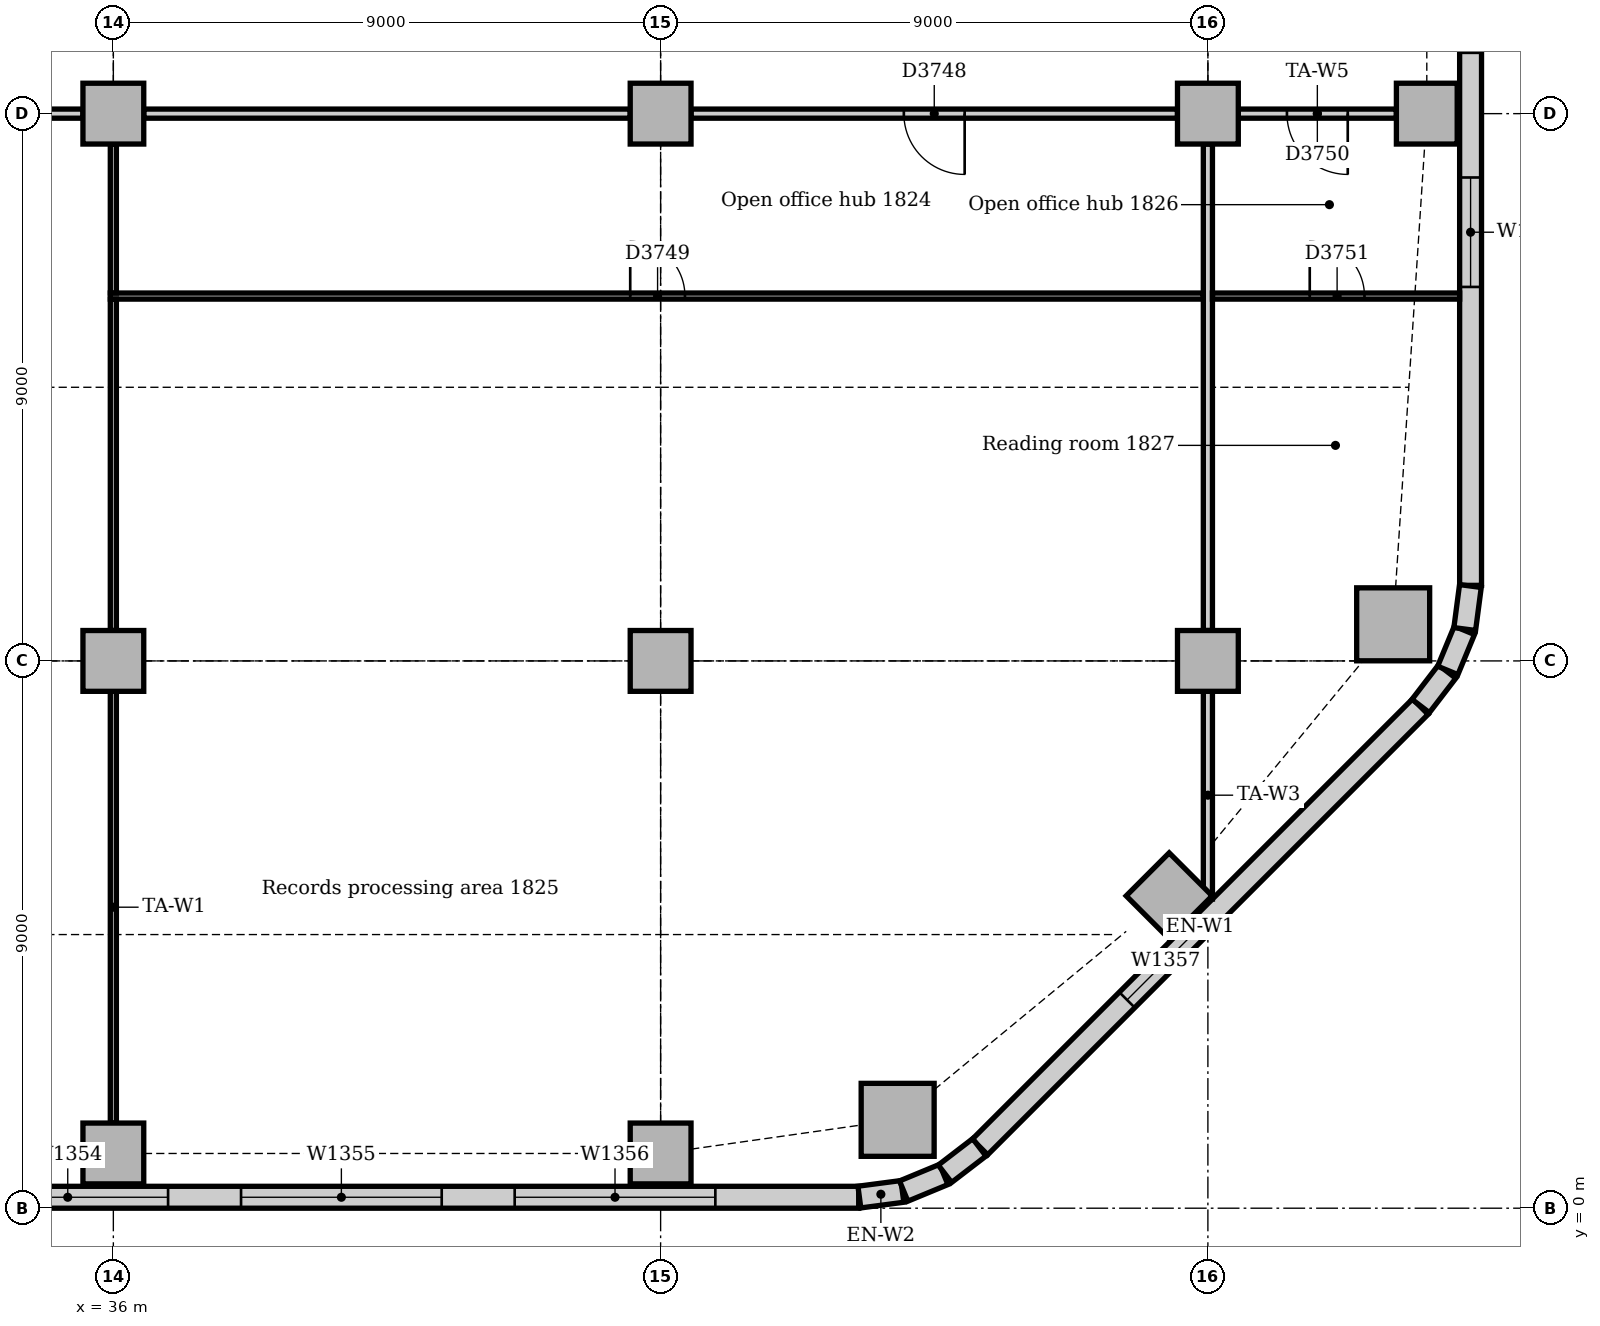
"""IFC4 building model, lengths in metres.
Left out: names, types, materials, properties, quantities, classifications, styles, units other than length and angle.
Written with IfcOpenShell. Run it as: python <this file> out.ifc"""

import sys

from ifc_helpers import new_model, si_unit, direction, frame, frame_2d, origin, origin_2d, place, context, subcontext, project, spatial, rectangle, extrude, element, fill, save


model = new_model("IFC4")
c1 = context("Model", 3, precision=1e-05, world=origin(), true_north=direction((0.0, 1.0)))
c2 = subcontext(c1, "Body", "Model", "MODEL_VIEW")
j1 = project(units=[si_unit("LENGTHUNIT", "METRE"), si_unit("PLANEANGLEUNIT", "RADIAN")], contexts=[c1])
p1 = place(None, origin())
s1 = spatial("IfcSite", under=j1, at=p1, CompositionType="ELEMENT")
p2 = place(p1, origin())
s2 = spatial("IfcBuilding", under=s1, at=p2, CompositionType="ELEMENT")
p3 = place(p2, frame((0.0, 0.0, 79.0)))
s3 = spatial("IfcBuildingStorey", under=s2, at=p3, CompositionType="ELEMENT", Elevation=79.0)
for number, where, z_axis, x_axis in (
    (1, (48.898, 1.453, 0.0), (0.0, 0.0, 1.0), (1.0, 0.0, 0.0)),
    (2, (57.047, 9.602, 0.0), (0.0, 0.0, 1.0), (1.0, 0.0, 0.0)),
):
    element("IfcColumn", number, at=place(p3, frame(where, z_axis=z_axis, x_axis=x_axis)), inside=s3, PredefinedType="COLUMN", context=c2, shape_type="SweptSolid", body=[
        extrude(rectangle(XDim=1.2, YDim=1.2, at=origin_2d()), origin(), (0.0, 0.0, 1.0), 3.85),
    ])
for number, where, z_axis, x_axis in (
    (3, (36.0, 0.9, 0.0), (0.0, 0.0, 1.0), (1.0, 0.0, 0.0)),
    (4, (45.0, 0.9, 0.0), (0.0, 0.0, 1.0), (1.0, 0.0, 0.0)),
    (5, (53.364, 5.136, 0.0), (0.0, 0.0, 1.0), (0.707, 0.707, 0.0)),
    (6, (57.6, 18.0, 0.0), (0.0, 0.0, 1.0), (1.0, 0.0, 0.0)),
    (7, (36.0, 9.0, 0.0), (0.0, 0.0, 1.0), (1.0, 0.0, 0.0)),
    (8, (36.0, 18.0, 0.0), (0.0, 0.0, 1.0), (1.0, 0.0, 0.0)),
    (9, (45.0, 9.0, 0.0), (0.0, 0.0, 1.0), (1.0, 0.0, 0.0)),
    (10, (45.0, 18.0, 0.0), (0.0, 0.0, 1.0), (1.0, 0.0, 0.0)),
    (11, (54.0, 9.0, 0.0), (0.0, 0.0, 1.0), (1.0, 0.0, 0.0)),
    (12, (54.0, 18.0, 0.0), (0.0, 0.0, 1.0), (1.0, 0.0, 0.0)),
):
    element("IfcColumn", number, at=place(p3, frame(where, z_axis=z_axis, x_axis=x_axis)), inside=s3, PredefinedType="COLUMN", context=c2, shape_type="SweptSolid", body=[
        extrude(rectangle(XDim=1.0, YDim=1.0, at=origin_2d()), origin(), (0.0, 0.0, 1.0), 3.85),
    ])
p4 = place(p3, frame((4.243, 0.18, 0.0), z_axis=(0.0, 0.0, 1.0), x_axis=(1.0, 0.0, 0.0)))
e13 = element("IfcWall", 13, at=p4, inside=s3, PredefinedType="STANDARD", context=c2, shape_type="SweptSolid", body=[
    extrude(rectangle(XDim=44.015, YDim=0.36, at=frame_2d((22.007, 0.0))), origin(), (0.0, 0.0, 1.0), 3.85),
])
p5 = place(p4, frame((2.707, 0.0, 0.9)))
e14 = element("IfcOpeningElement", 14, at=p5, cuts=e13, PredefinedType="OPENING", context=c2, shape_type="SweptSolid", body=[
    extrude(rectangle(XDim=3.3, YDim=1.6, at=frame_2d((1.65, 0.8))), frame((0.0, 0.19, 0.0), z_axis=(0.0, -1.0, 0.0), x_axis=(1.0, 0.0, 0.0)), (0.0, 0.0, 1.0), 0.38),
])
p6 = place(p4, frame((7.307, 0.0, 0.9)))
e15 = element("IfcOpeningElement", 15, at=p6, cuts=e13, PredefinedType="OPENING", context=c2, shape_type="SweptSolid", body=[
    extrude(rectangle(XDim=1.8, YDim=1.6, at=frame_2d((0.9, 0.8))), frame((0.0, 0.19, 0.0), z_axis=(0.0, -1.0, 0.0), x_axis=(1.0, 0.0, 0.0)), (0.0, 0.0, 1.0), 0.38),
])
p7 = place(p4, frame((11.357, 0.0, 0.9)))
e16 = element("IfcOpeningElement", 16, at=p7, cuts=e13, PredefinedType="OPENING", context=c2, shape_type="SweptSolid", body=[
    extrude(rectangle(XDim=3.3, YDim=1.6, at=frame_2d((1.65, 0.8))), frame((0.0, 0.19, 0.0), z_axis=(0.0, -1.0, 0.0), x_axis=(1.0, 0.0, 0.0)), (0.0, 0.0, 1.0), 0.38),
])
p8 = place(p4, frame((15.857, 0.0, 0.9)))
e17 = element("IfcOpeningElement", 17, at=p8, cuts=e13, PredefinedType="OPENING", context=c2, shape_type="SweptSolid", body=[
    extrude(rectangle(XDim=3.3, YDim=1.6, at=frame_2d((1.65, 0.8))), frame((0.0, 0.19, 0.0), z_axis=(0.0, -1.0, 0.0), x_axis=(1.0, 0.0, 0.0)), (0.0, 0.0, 1.0), 0.38),
])
p9 = place(p4, frame((20.357, 0.0, 0.9)))
e18 = element("IfcOpeningElement", 18, at=p9, cuts=e13, PredefinedType="OPENING", context=c2, shape_type="SweptSolid", body=[
    extrude(rectangle(XDim=3.3, YDim=1.6, at=frame_2d((1.65, 0.8))), frame((0.0, 0.19, 0.0), z_axis=(0.0, -1.0, 0.0), x_axis=(1.0, 0.0, 0.0)), (0.0, 0.0, 1.0), 0.38),
])
p10 = place(p4, frame((24.857, 0.0, 0.9)))
e19 = element("IfcOpeningElement", 19, at=p10, cuts=e13, PredefinedType="OPENING", context=c2, shape_type="SweptSolid", body=[
    extrude(rectangle(XDim=3.3, YDim=1.6, at=frame_2d((1.65, 0.8))), frame((0.0, 0.19, 0.0), z_axis=(0.0, -1.0, 0.0), x_axis=(1.0, 0.0, 0.0)), (0.0, 0.0, 1.0), 0.38),
])
p11 = place(p4, frame((29.357, 0.0, 0.9)))
e20 = element("IfcOpeningElement", 20, at=p11, cuts=e13, PredefinedType="OPENING", context=c2, shape_type="SweptSolid", body=[
    extrude(rectangle(XDim=3.3, YDim=1.6, at=frame_2d((1.65, 0.8))), frame((0.0, 0.19, 0.0), z_axis=(0.0, -1.0, 0.0), x_axis=(1.0, 0.0, 0.0)), (0.0, 0.0, 1.0), 0.38),
])
p12 = place(p4, frame((33.857, 0.0, 0.9)))
e21 = element("IfcOpeningElement", 21, at=p12, cuts=e13, PredefinedType="OPENING", context=c2, shape_type="SweptSolid", body=[
    extrude(rectangle(XDim=3.3, YDim=1.6, at=frame_2d((1.65, 0.8))), frame((0.0, 0.19, 0.0), z_axis=(0.0, -1.0, 0.0), x_axis=(1.0, 0.0, 0.0)), (0.0, 0.0, 1.0), 0.38),
])
p13 = place(p4, frame((38.357, 0.0, 0.9)))
e22 = element("IfcOpeningElement", 22, at=p13, cuts=e13, PredefinedType="OPENING", context=c2, shape_type="SweptSolid", body=[
    extrude(rectangle(XDim=3.3, YDim=1.6, at=frame_2d((1.65, 0.8))), frame((0.0, 0.19, 0.0), z_axis=(0.0, -1.0, 0.0), x_axis=(1.0, 0.0, 0.0)), (0.0, 0.0, 1.0), 0.38),
])
p14 = place(p3, frame((50.251, 1.006, 0.0), z_axis=(0.0, 0.0, 1.0), x_axis=(0.707106781187, 0.707106781187, 0.0)))
e23 = element("IfcWall", 23, at=p14, inside=s3, PredefinedType="STANDARD", context=c2, shape_type="SweptSolid", body=[
    extrude(rectangle(XDim=10.243, YDim=0.36, at=frame_2d((5.121, 0.0))), origin(), (0.0, 0.0, 1.0), 3.85),
])
p15 = place(p14, frame((3.421, 0.0, 0.9)))
e24 = element("IfcOpeningElement", 24, at=p15, cuts=e23, PredefinedType="OPENING", context=c2, shape_type="SweptSolid", body=[
    extrude(rectangle(XDim=1.8, YDim=1.6, at=frame_2d((0.9, 0.8))), frame((0.0, 0.19, 0.0), z_axis=(0.0, -1.0, 0.0), x_axis=(1.0, 0.0, 0.0)), (0.0, 0.0, 1.0), 0.38),
])
p16 = place(p3, frame((58.32, 10.243, 0.0), z_axis=(0.0, 0.0, 1.0), x_axis=(0.0, 1.0, 0.0)))
e25 = element("IfcWall", 25, at=p16, inside=s3, PredefinedType="STANDARD", context=c2, shape_type="SweptSolid", body=[
    extrude(rectangle(XDim=24.515, YDim=0.36, at=frame_2d((12.257, 0.0))), origin(), (0.0, 0.0, 1.0), 3.85),
])
p17 = place(p16, frame((4.907, 0.0, 0.9)))
e26 = element("IfcOpeningElement", 26, at=p17, cuts=e25, PredefinedType="OPENING", context=c2, shape_type="SweptSolid", body=[
    extrude(rectangle(XDim=1.8, YDim=1.6, at=frame_2d((0.9, 0.8))), frame((0.0, 0.19, 0.0), z_axis=(0.0, -1.0, 0.0), x_axis=(1.0, 0.0, 0.0)), (0.0, 0.0, 1.0), 0.38),
])
p18 = place(p16, frame((8.757, 0.0, 0.9)))
e27 = element("IfcOpeningElement", 27, at=p18, cuts=e25, PredefinedType="OPENING", context=c2, shape_type="SweptSolid", body=[
    extrude(rectangle(XDim=1.8, YDim=1.6, at=frame_2d((0.9, 0.8))), frame((0.0, 0.19, 0.0), z_axis=(0.0, -1.0, 0.0), x_axis=(1.0, 0.0, 0.0)), (0.0, 0.0, 1.0), 0.38),
])
p19 = place(p16, frame((12.857, 0.0, 0.9)))
e28 = element("IfcOpeningElement", 28, at=p19, cuts=e25, PredefinedType="OPENING", context=c2, shape_type="SweptSolid", body=[
    extrude(rectangle(XDim=3.3, YDim=1.6, at=frame_2d((1.65, 0.8))), frame((0.0, 0.19, 0.0), z_axis=(0.0, -1.0, 0.0), x_axis=(1.0, 0.0, 0.0)), (0.0, 0.0, 1.0), 0.38),
])
p20 = place(p16, frame((17.357, 0.0, 0.9)))
e29 = element("IfcOpeningElement", 29, at=p20, cuts=e25, PredefinedType="OPENING", context=c2, shape_type="SweptSolid", body=[
    extrude(rectangle(XDim=3.3, YDim=1.6, at=frame_2d((1.65, 0.8))), frame((0.0, 0.19, 0.0), z_axis=(0.0, -1.0, 0.0), x_axis=(1.0, 0.0, 0.0)), (0.0, 0.0, 1.0), 0.38),
])
for number, where, z_axis, x_axis in (
    (30, (48.269, 0.183, 0.0), (0.0, 0.0, 1.0), (0.991, 0.131, 0.0)),
    (31, (48.997, 0.282, 0.0), (0.0, 0.0, 1.0), (0.924, 0.383, 0.0)),
):
    element("IfcWall", number, at=place(p3, frame(where, z_axis=z_axis, x_axis=x_axis)), inside=s3, PredefinedType="STANDARD", context=c2, shape_type="SweptSolid", body=[
        extrude(rectangle(XDim=0.713, YDim=0.36, at=frame_2d((0.356, 0.0))), origin(), (0.0, 0.0, 1.0), 3.85),
    ])
for number, where, z_axis, x_axis in (
    (32, (49.675, 0.566, 0.0), (0.0, 0.0, 1.0), (0.793, 0.609, 0.0)),
    (33, (57.5, 8.259, 0.0), (0.0, 0.0, 1.0), (0.609, 0.793, 0.0)),
):
    element("IfcWall", number, at=place(p3, frame(where, z_axis=z_axis, x_axis=x_axis)), inside=s3, PredefinedType="STANDARD", context=c2, shape_type="SweptSolid", body=[
        extrude(rectangle(XDim=0.713, YDim=0.36, at=frame_2d((0.357, 0.0))), origin(), (0.0, 0.0, 1.0), 3.85),
    ])
for number, where, z_axis, x_axis in (
    (34, (57.945, 8.844, 0.0), (0.0, 0.0, 1.0), (0.383, 0.924, 0.0)),
    (35, (58.224, 9.524, 0.0), (0.0, 0.0, 1.0), (0.131, 0.991, 0.0)),
):
    element("IfcWall", number, at=place(p3, frame(where, z_axis=z_axis, x_axis=x_axis)), inside=s3, PredefinedType="STANDARD", context=c2, shape_type="SweptSolid", body=[
        extrude(rectangle(XDim=0.713, YDim=0.36, at=frame_2d((0.356, 0.0))), origin(), (0.0, 0.0, 1.0), 3.85),
    ])
p21 = place(p3, frame((54.5, 18.0, 0.0), z_axis=(0.0, 0.0, 1.0), x_axis=(1.0, 0.0, 0.0)))
e36 = element("IfcWall", 36, at=p21, inside=s3, PredefinedType="PARTITIONING", context=c2, shape_type="SweptSolid", body=[
    extrude(rectangle(XDim=2.6, YDim=0.15, at=frame_2d((1.3, 0.0))), origin(), (0.0, 0.0, 1.0), 3.602),
])
p22 = place(p21, frame((0.8, 0.0, 0.0)))
e37 = element("IfcOpeningElement", 37, at=p22, cuts=e36, PredefinedType="OPENING", context=c2, shape_type="SweptSolid", body=[
    extrude(rectangle(XDim=1.0, YDim=2.1, at=frame_2d((0.5, 1.05))), frame((0.0, 0.085, 0.0), z_axis=(0.0, -1.0, 0.0), x_axis=(1.0, 0.0, 0.0)), (0.0, 0.0, 1.0), 0.17),
])
p23 = place(p3, frame((45.5, 18.0, 0.0), z_axis=(0.0, 0.0, 1.0), x_axis=(1.0, 0.0, 0.0)))
e38 = element("IfcWall", 38, at=p23, inside=s3, PredefinedType="PARTITIONING", context=c2, shape_type="SweptSolid", body=[
    extrude(rectangle(XDim=8.0, YDim=0.15, at=frame_2d((4.0, 0.0))), origin(), (0.0, 0.0, 1.0), 3.15),
])
p24 = place(p23, frame((3.5, 0.0, 0.0)))
e39 = element("IfcOpeningElement", 39, at=p24, cuts=e38, PredefinedType="OPENING", context=c2, shape_type="SweptSolid", body=[
    extrude(rectangle(XDim=1.0, YDim=2.1, at=frame_2d((0.5, 1.05))), frame((0.0, 0.085, 0.0), z_axis=(0.0, -1.0, 0.0), x_axis=(1.0, 0.0, 0.0)), (0.0, 0.0, 1.0), 0.17),
])
p25 = place(p3, frame((36.5, 18.0, 0.0), z_axis=(0.0, 0.0, 1.0), x_axis=(1.0, 0.0, 0.0)))
e40 = element("IfcWall", 40, at=p25, inside=s3, PredefinedType="PARTITIONING", context=c2, shape_type="SweptSolid", body=[
    extrude(rectangle(XDim=8.0, YDim=0.15, at=frame_2d((4.0, 0.0))), origin(), (0.0, 0.0, 1.0), 3.15),
])
p26 = place(p3, frame((27.5, 18.0, 0.0), z_axis=(0.0, 0.0, 1.0), x_axis=(1.0, 0.0, 0.0)))
e41 = element("IfcWall", 41, at=p26, inside=s3, PredefinedType="PARTITIONING", context=c2, shape_type="SweptSolid", body=[
    extrude(rectangle(XDim=8.0, YDim=0.15, at=frame_2d((4.0, 0.0))), origin(), (0.0, 0.0, 1.0), 3.15),
])
p27 = place(p26, frame((3.55, 0.0, 0.0)))
e42 = element("IfcOpeningElement", 42, at=p27, cuts=e41, PredefinedType="OPENING", context=c2, shape_type="SweptSolid", body=[
    extrude(rectangle(XDim=0.9, YDim=2.1, at=frame_2d((0.45, 1.05))), frame((0.0, 0.085, 0.0), z_axis=(0.0, -1.0, 0.0), x_axis=(1.0, 0.0, 0.0)), (0.0, 0.0, 1.0), 0.17),
])
p28 = place(p3, frame((54.0, 5.084, 0.0), z_axis=(0.0, 0.0, 1.0), x_axis=(0.0, 1.0, 0.0)))
e43 = element("IfcWall", 43, at=p28, inside=s3, PredefinedType="PARTITIONING", context=c2, shape_type="SweptSolid", body=[
    extrude(rectangle(XDim=3.416, YDim=0.15, at=frame_2d((1.708, 0.0))), origin(), (0.0, 0.0, 1.0), 3.652),
])
p29 = place(p3, frame((54.0, 9.5, 0.0), z_axis=(0.0, 0.0, 1.0), x_axis=(0.0, 1.0, 0.0)))
e44 = element("IfcWall", 44, at=p29, inside=s3, PredefinedType="PARTITIONING", context=c2, shape_type="SweptSolid", body=[
    extrude(rectangle(XDim=8.0, YDim=0.15, at=frame_2d((4.0, 0.0))), origin(), (0.0, 0.0, 1.0), 3.158),
])
p30 = place(p3, frame((35.95, 15.0, 0.0), z_axis=(0.0, 0.0, 1.0), x_axis=(1.0, 0.0, 0.0)))
e45 = element("IfcWall", 45, at=p30, inside=s3, PredefinedType="PARTITIONING", context=c2, shape_type="SweptSolid", body=[
    extrude(rectangle(XDim=17.975, YDim=0.1, at=frame_2d((8.988, 0.0))), origin(), (0.0, 0.0, 1.0), 3.85),
])
p31 = place(p30, frame((8.55, 0.0, 0.0)))
e46 = element("IfcOpeningElement", 46, at=p31, cuts=e45, PredefinedType="OPENING", context=c2, shape_type="SweptSolid", body=[
    extrude(rectangle(XDim=0.9, YDim=2.1, at=frame_2d((0.45, 1.05))), frame((0.0, 0.06, 0.0), z_axis=(0.0, -1.0, 0.0), x_axis=(1.0, 0.0, 0.0)), (0.0, 0.0, 1.0), 0.12),
])
p32 = place(p3, frame((54.075, 15.0, 0.0), z_axis=(0.0, 0.0, 1.0), x_axis=(1.0, 0.0, 0.0)))
e47 = element("IfcWall", 47, at=p32, inside=s3, PredefinedType="PARTITIONING", context=c2, shape_type="SweptSolid", body=[
    extrude(rectangle(XDim=4.065, YDim=0.1, at=frame_2d((2.033, 0.0))), origin(), (0.0, 0.0, 1.0), 3.85),
])
p33 = place(p32, frame((1.6, 0.0, 0.0)))
e48 = element("IfcOpeningElement", 48, at=p33, cuts=e47, PredefinedType="OPENING", context=c2, shape_type="SweptSolid", body=[
    extrude(rectangle(XDim=0.9, YDim=2.1, at=frame_2d((0.45, 1.05))), frame((0.0, 0.06, 0.0), z_axis=(0.0, -1.0, 0.0), x_axis=(1.0, 0.0, 0.0)), (0.0, 0.0, 1.0), 0.12),
])
p34 = place(p3, frame((36.0, 1.4, 0.0), z_axis=(0.0, 0.0, 1.0), x_axis=(0.0, 1.0, 0.0)))
e49 = element("IfcWall", 49, at=p34, inside=s3, PredefinedType="PARTITIONING", context=c2, shape_type="SweptSolid", body=[
    extrude(rectangle(XDim=7.1, YDim=0.1, at=frame_2d((3.55, 0.0))), origin(), (0.0, 0.0, 1.0), 3.158),
])
p35 = place(p3, frame((36.0, 15.05, 0.0), z_axis=(0.0, 0.0, 1.0), x_axis=(0.0, 1.0, 0.0)))
e50 = element("IfcWall", 50, at=p35, inside=s3, PredefinedType="PARTITIONING", context=c2, shape_type="SweptSolid", body=[
    extrude(rectangle(XDim=2.45, YDim=0.1, at=frame_2d((1.225, 0.0))), origin(), (0.0, 0.0, 1.0), 3.158),
])
p36 = place(p3, frame((36.0, 9.5, 0.0), z_axis=(0.0, 0.0, 1.0), x_axis=(0.0, 1.0, 0.0)))
e51 = element("IfcWall", 51, at=p36, inside=s3, PredefinedType="PARTITIONING", context=c2, shape_type="SweptSolid", body=[
    extrude(rectangle(XDim=5.45, YDim=0.1, at=frame_2d((2.725, 0.0))), origin(), (0.0, 0.0, 1.0), 3.158),
])
p37 = place(p11, origin())
e52 = element("IfcWindow", 52, at=p37, inside=s3, PartitioningType="SINGLE_PANEL", PredefinedType="WINDOW", context=c2, shape_type="SweptSolid", body=[
    extrude(rectangle(XDim=3.3, YDim=1.6, at=frame_2d((1.65, 0.8))), frame((0.0, 0.13, 0.0), z_axis=(0.0, -1.0, 0.0), x_axis=(1.0, 0.0, 0.0)), (0.0, 0.0, 1.0), 0.06),
])
fill(e20, e52)
p38 = place(p12, origin())
e53 = element("IfcWindow", 53, at=p38, inside=s3, PartitioningType="SINGLE_PANEL", PredefinedType="WINDOW", context=c2, shape_type="SweptSolid", body=[
    extrude(rectangle(XDim=3.3, YDim=1.6, at=frame_2d((1.65, 0.8))), frame((0.0, 0.13, 0.0), z_axis=(0.0, -1.0, 0.0), x_axis=(1.0, 0.0, 0.0)), (0.0, 0.0, 1.0), 0.06),
])
fill(e21, e53)
p39 = place(p13, origin())
e54 = element("IfcWindow", 54, at=p39, inside=s3, PartitioningType="SINGLE_PANEL", PredefinedType="WINDOW", context=c2, shape_type="SweptSolid", body=[
    extrude(rectangle(XDim=3.3, YDim=1.6, at=frame_2d((1.65, 0.8))), frame((0.0, 0.13, 0.0), z_axis=(0.0, -1.0, 0.0), x_axis=(1.0, 0.0, 0.0)), (0.0, 0.0, 1.0), 0.06),
])
fill(e22, e54)
p40 = place(p15, origin())
e55 = element("IfcWindow", 55, at=p40, inside=s3, PartitioningType="SINGLE_PANEL", PredefinedType="WINDOW", context=c2, shape_type="SweptSolid", body=[
    extrude(rectangle(XDim=1.8, YDim=1.6, at=frame_2d((0.9, 0.8))), frame((0.0, 0.13, 0.0), z_axis=(0.0, -1.0, 0.0), x_axis=(1.0, 0.0, 0.0)), (0.0, 0.0, 1.0), 0.06),
])
fill(e24, e55)
p41 = place(p17, origin())
e56 = element("IfcWindow", 56, at=p41, inside=s3, PartitioningType="SINGLE_PANEL", PredefinedType="WINDOW", context=c2, shape_type="SweptSolid", body=[
    extrude(rectangle(XDim=1.8, YDim=1.6, at=frame_2d((0.9, 0.8))), frame((0.0, 0.13, 0.0), z_axis=(0.0, -1.0, 0.0), x_axis=(1.0, 0.0, 0.0)), (0.0, 0.0, 1.0), 0.06),
])
fill(e26, e56)
p42 = place(p24, frame((1.0, 0.0, 0.0), z_axis=(0.0, 0.0, 1.0), x_axis=(-1.0, 0.0, 0.0)))
e57 = element("IfcDoor", 57, at=p42, inside=s3, OperationType="SINGLE_SWING_LEFT", PredefinedType="DOOR", context=c2, shape_type="SweptSolid", body=[
    extrude(rectangle(XDim=1.0, YDim=2.1, at=frame_2d((0.5, 1.05))), frame((0.0, 0.025, 0.0), z_axis=(0.0, -1.0, 0.0), x_axis=(1.0, 0.0, 0.0)), (0.0, 0.0, 1.0), 0.05),
])
fill(e39, e57)
p43 = place(p31, origin())
e58 = element("IfcDoor", 58, at=p43, inside=s3, OperationType="SINGLE_SWING_LEFT", PredefinedType="DOOR", context=c2, shape_type="SweptSolid", body=[
    extrude(rectangle(XDim=0.9, YDim=2.1, at=frame_2d((0.45, 1.05))), frame((0.0, 0.025, 0.0), z_axis=(0.0, -1.0, 0.0), x_axis=(1.0, 0.0, 0.0)), (0.0, 0.0, 1.0), 0.05),
])
fill(e46, e58)
p44 = place(p22, frame((1.0, 0.0, 0.0), z_axis=(0.0, 0.0, 1.0), x_axis=(-1.0, 0.0, 0.0)))
e59 = element("IfcDoor", 59, at=p44, inside=s3, OperationType="SINGLE_SWING_LEFT", PredefinedType="DOOR", context=c2, shape_type="SweptSolid", body=[
    extrude(rectangle(XDim=1.0, YDim=2.1, at=frame_2d((0.5, 1.05))), frame((0.0, 0.025, 0.0), z_axis=(0.0, -1.0, 0.0), x_axis=(1.0, 0.0, 0.0)), (0.0, 0.0, 1.0), 0.05),
])
fill(e37, e59)
p45 = place(p33, origin())
e60 = element("IfcDoor", 60, at=p45, inside=s3, OperationType="SINGLE_SWING_LEFT", PredefinedType="DOOR", context=c2, shape_type="SweptSolid", body=[
    extrude(rectangle(XDim=0.9, YDim=2.1, at=frame_2d((0.45, 1.05))), frame((0.0, 0.025, 0.0), z_axis=(0.0, -1.0, 0.0), x_axis=(1.0, 0.0, 0.0)), (0.0, 0.0, 1.0), 0.05),
])
fill(e48, e60)
save(model, sys.argv[1])
